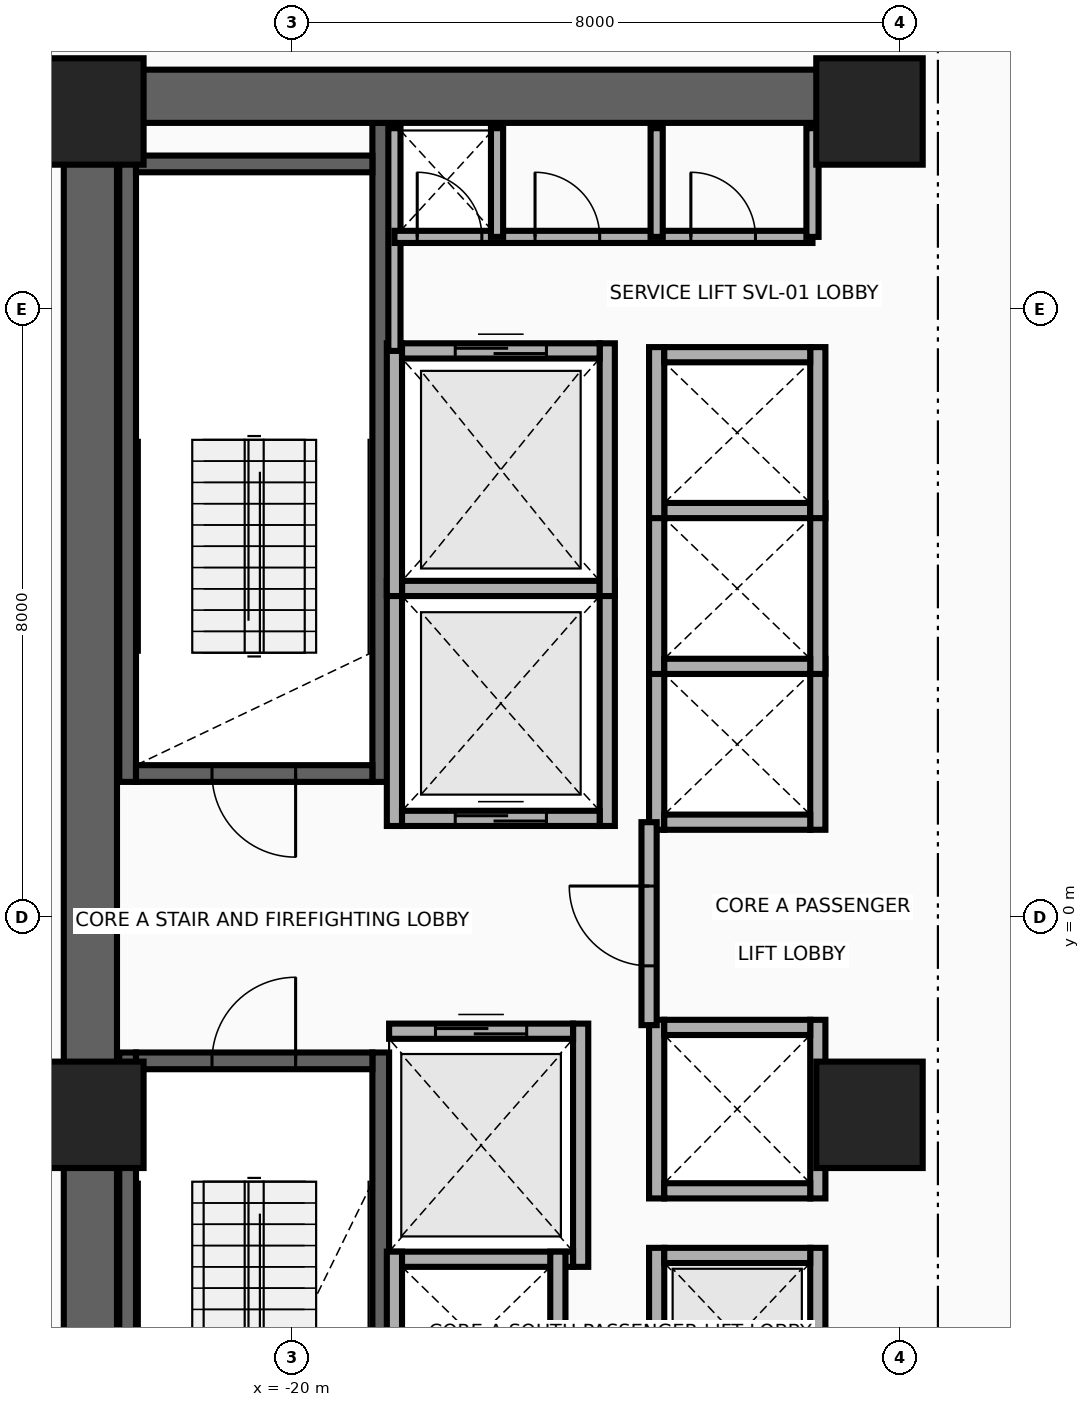
"""IFC4 building model, lengths in metres.
Left out: names, types, materials, properties, quantities, classifications, styles, units other than length and angle.
Written with IfcOpenShell. Run it as: python <this file> out.ifc"""

import sys

from ifc_helpers import new_model, si_unit, direction, frame, frame_2d, origin, origin_2d, place, context, subcontext, project, spatial, rectangle, extrude, source, transform, mapped, element, fill, save


model = new_model("IFC4")
c1 = context("Model", 3, precision=1e-05, world=origin(), true_north=direction((0.0, 1.0)))
c2 = subcontext(c1, "Body", "Model", "MODEL_VIEW")
j1 = project(units=[si_unit("LENGTHUNIT", "METRE"), si_unit("PLANEANGLEUNIT", "RADIAN")], contexts=[c1])
p1 = place(None, origin())
s1 = spatial("IfcSite", under=j1, at=p1, CompositionType="ELEMENT")
p2 = place(p1, origin())
s2 = spatial("IfcBuilding", under=s1, at=p2, CompositionType="ELEMENT")
p3 = place(p2, frame((0.0, 0.0, 85.2)))
s3 = spatial("IfcBuildingStorey", under=s2, at=p3, CompositionType="ELEMENT", Elevation=85.2)
for number, where, z_axis, x_axis in (
    (1, (-22.16, 1.78, 0.0), (0.0, 0.0, 1.0), (0.0, 1.0, 0.0)),
    (2, (-18.83, 1.78, 0.0), (0.0, 0.0, 1.0), (0.0, 1.0, 0.0)),
):
    element("IfcWall", number, at=place(p3, frame(where, z_axis=z_axis, x_axis=x_axis)), inside=s3, PredefinedType="SHEAR", context=c2, shape_type="SweptSolid", body=[
        extrude(rectangle(XDim=8.67, YDim=0.22, at=frame_2d((4.335, 0.0))), origin(), (0.0, 0.0, 1.0), 3.46),
    ])
p4 = place(p3, frame((-22.05, 1.89, 0.0), z_axis=(0.0, 0.0, 1.0), x_axis=(1.0, 0.0, 0.0)))
e3 = element("IfcWall", 3, at=p4, inside=s3, PredefinedType="SHEAR", context=c2, shape_type="SweptSolid", body=[
    extrude(rectangle(XDim=3.11, YDim=0.22, at=frame_2d((1.555, 0.0))), origin(), (0.0, 0.0, 1.0), 3.46),
])
p5 = place(p4, frame((1.0, 0.0, 0.0)))
e4 = element("IfcOpeningElement", 4, at=p5, cuts=e3, PredefinedType="OPENING", context=c2, shape_type="SweptSolid", body=[
    extrude(rectangle(XDim=1.1, YDim=2.15, at=frame_2d((0.55, 1.075))), frame((0.0, 0.125, 0.0), z_axis=(0.0, -1.0, 0.0), x_axis=(1.0, 0.0, 0.0)), (0.0, 0.0, 1.0), 0.25),
])
p6 = place(p3, frame((-22.05, 9.91, 0.0), z_axis=(0.0, 0.0, 1.0), x_axis=(1.0, 0.0, 0.0)))
e5 = element("IfcWall", 5, at=p6, inside=s3, PredefinedType="SHEAR", context=c2, shape_type="SweptSolid", body=[
    extrude(rectangle(XDim=3.11, YDim=0.22, at=frame_2d((1.555, 0.0))), origin(), (0.0, 0.0, 1.0), 3.46),
])
for number, where, z_axis, x_axis in (
    (6, (-22.16, -10.45, 0.0), (0.0, 0.0, 1.0), (0.0, 1.0, 0.0)),
    (7, (-18.83, -10.45, 0.0), (0.0, 0.0, 1.0), (0.0, 1.0, 0.0)),
):
    element("IfcWall", number, at=place(p3, frame(where, z_axis=z_axis, x_axis=x_axis)), inside=s3, PredefinedType="SHEAR", context=c2, shape_type="SweptSolid", body=[
        extrude(rectangle(XDim=8.67, YDim=0.22, at=frame_2d((4.335, 0.0))), origin(), (0.0, 0.0, 1.0), 3.46),
    ])
p7 = place(p3, frame((-22.05, -1.89, 0.0), z_axis=(0.0, 0.0, 1.0), x_axis=(1.0, 0.0, 0.0)))
e8 = element("IfcWall", 8, at=p7, inside=s3, PredefinedType="SHEAR", context=c2, shape_type="SweptSolid", body=[
    extrude(rectangle(XDim=3.11, YDim=0.22, at=frame_2d((1.555, 0.0))), origin(), (0.0, 0.0, 1.0), 3.46),
])
p8 = place(p7, frame((1.0, 0.0, 0.0)))
e9 = element("IfcOpeningElement", 9, at=p8, cuts=e8, PredefinedType="OPENING", context=c2, shape_type="SweptSolid", body=[
    extrude(rectangle(XDim=1.1, YDim=2.15, at=frame_2d((0.55, 1.075))), frame((0.0, 0.125, 0.0), z_axis=(0.0, -1.0, 0.0), x_axis=(1.0, 0.0, 0.0)), (0.0, 0.0, 1.0), 0.25),
])
p9 = place(p3, frame((-22.65, -11.15, 0.0), z_axis=(0.0, 0.0, 1.0), x_axis=(0.0, 1.0, 0.0)))
e10 = element("IfcWall", 10, at=p9, inside=s3, PredefinedType="SHEAR", context=c2, shape_type="SweptSolid", body=[
    extrude(rectangle(XDim=22.3, YDim=0.7, at=frame_2d((11.15, 0.0))), origin(), (0.0, 0.0, 1.0), 3.46),
])
p10 = place(p3, frame((-22.65, 10.8, 0.0), z_axis=(0.0, 0.0, 1.0), x_axis=(1.0, 0.0, 0.0)))
e11 = element("IfcWall", 11, at=p10, inside=s3, PredefinedType="SHEAR", context=c2, shape_type="SweptSolid", body=[
    extrude(rectangle(XDim=10.25, YDim=0.7, at=frame_2d((5.125, 0.0))), origin(), (0.0, 0.0, 1.0), 3.46),
])
m1 = source(origin(), c2, "Body", "SweptSolid", [
    extrude(rectangle(XDim=1.4, YDim=1.4, at=origin_2d()), origin(), (0.0, 0.0, 1.0), 3.7),
])
for number, where, z_axis, x_axis in (
    (12, (-22.65, -2.6, 0.0), (0.0, 0.0, 1.0), (1.0, 0.0, 0.0)),
    (13, (-12.4, -2.6, 0.0), (0.0, 0.0, 1.0), (1.0, 0.0, 0.0)),
    (14, (-22.65, 10.6, 0.0), (0.0, 0.0, 1.0), (1.0, 0.0, 0.0)),
    (15, (-12.4, 10.6, 0.0), (0.0, 0.0, 1.0), (1.0, 0.0, 0.0)),
):
    element("IfcColumn", number, at=place(p3, frame(where, z_axis=z_axis, x_axis=x_axis)), inside=s3, PredefinedType="COLUMN", context=c2, shape_type="MappedRepresentation", body=[
        mapped(m1, transform((0.0, 0.0, 0.0), x_axis=(1.0, 0.0, 0.0), y_axis=(0.0, 1.0, 0.0), z_axis=(0.0, 0.0, 1.0), scale=1.0)),
    ])
for number, where, z_axis, x_axis in (
    (16, (-18.65, 1.2, 0.0), (0.0, 0.0, 1.0), (0.0, 1.0, 0.0)),
    (17, (-15.85, 1.2, 0.0), (0.0, 0.0, 1.0), (0.0, 1.0, 0.0)),
):
    element("IfcWall", number, at=place(p3, frame(where, z_axis=z_axis, x_axis=x_axis)), inside=s3, PredefinedType="MOVABLE", context=c2, shape_type="SweptSolid", body=[
        extrude(rectangle(XDim=3.225, YDim=0.2, at=frame_2d((1.613, 0.0))), origin(), (0.0, 0.0, 1.0), 3.46),
    ])
p11 = place(p3, frame((-18.55, 1.3, 0.0), z_axis=(0.0, 0.0, 1.0), x_axis=(1.0, 0.0, 0.0)))
e18 = element("IfcWall", 18, at=p11, inside=s3, PredefinedType="MOVABLE", context=c2, shape_type="SweptSolid", body=[
    extrude(rectangle(XDim=2.6, YDim=0.2, at=frame_2d((1.3, 0.0))), origin(), (0.0, 0.0, 1.0), 3.46),
])
p12 = place(p11, frame((0.7, 0.0, 0.0)))
e19 = element("IfcOpeningElement", 19, at=p12, cuts=e18, PredefinedType="OPENING", context=c2, shape_type="SweptSolid", body=[
    extrude(rectangle(XDim=1.2, YDim=2.1, at=frame_2d((0.6, 1.05))), frame((0.0, 0.115, 0.0), z_axis=(0.0, -1.0, 0.0), x_axis=(1.0, 0.0, 0.0)), (0.0, 0.0, 1.0), 0.23),
])
p13 = place(p3, frame((-18.55, 4.325, 0.0), z_axis=(0.0, 0.0, 1.0), x_axis=(1.0, 0.0, 0.0)))
e20 = element("IfcWall", 20, at=p13, inside=s3, PredefinedType="MOVABLE", context=c2, shape_type="SweptSolid", body=[
    extrude(rectangle(XDim=2.6, YDim=0.2, at=frame_2d((1.3, 0.0))), origin(), (0.0, 0.0, 1.0), 3.46),
])
p14 = place(p3, frame((-16.2, -4.6, 0.0), z_axis=(0.0, 0.0, 1.0), x_axis=(0.0, 1.0, 0.0)))
e21 = element("IfcWall", 21, at=p14, inside=s3, PredefinedType="MOVABLE", context=c2, shape_type="SweptSolid", body=[
    extrude(rectangle(XDim=3.2, YDim=0.2, at=frame_2d((1.6, 0.0))), origin(), (0.0, 0.0, 1.0), 3.46),
])
p15 = place(p3, frame((-18.72, -4.5, 0.0), z_axis=(0.0, 0.0, 1.0), x_axis=(1.0, 0.0, 0.0)))
e22 = element("IfcWall", 22, at=p15, inside=s3, PredefinedType="MOVABLE", context=c2, shape_type="SweptSolid", body=[
    extrude(rectangle(XDim=2.42, YDim=0.2, at=frame_2d((1.21, 0.0))), origin(), (0.0, 0.0, 1.0), 3.46),
])
p16 = place(p3, frame((-18.72, -1.5, 0.0), z_axis=(0.0, 0.0, 1.0), x_axis=(1.0, 0.0, 0.0)))
e23 = element("IfcWall", 23, at=p16, inside=s3, PredefinedType="MOVABLE", context=c2, shape_type="SweptSolid", body=[
    extrude(rectangle(XDim=2.42, YDim=0.2, at=frame_2d((1.21, 0.0))), origin(), (0.0, 0.0, 1.0), 3.46),
])
p17 = place(p16, frame((0.61, 0.0, 0.0)))
e24 = element("IfcOpeningElement", 24, at=p17, cuts=e23, PredefinedType="OPENING", context=c2, shape_type="SweptSolid", body=[
    extrude(rectangle(XDim=1.2, YDim=2.1, at=frame_2d((0.6, 1.05))), frame((0.0, 0.115, 0.0), z_axis=(0.0, -1.0, 0.0), x_axis=(1.0, 0.0, 0.0)), (0.0, 0.0, 1.0), 0.23),
])
for number, where, z_axis, x_axis in (
    (25, (-18.65, 4.225, 0.0), (0.0, 0.0, 1.0), (0.0, 1.0, 0.0)),
    (26, (-15.85, 4.225, 0.0), (0.0, 0.0, 1.0), (0.0, 1.0, 0.0)),
):
    element("IfcWall", number, at=place(p3, frame(where, z_axis=z_axis, x_axis=x_axis)), inside=s3, PredefinedType="MOVABLE", context=c2, shape_type="SweptSolid", body=[
        extrude(rectangle(XDim=3.325, YDim=0.2, at=frame_2d((1.663, 0.0))), origin(), (0.0, 0.0, 1.0), 3.46),
    ])
p18 = place(p3, frame((-18.55, 7.45, 0.0), z_axis=(0.0, 0.0, 1.0), x_axis=(1.0, 0.0, 0.0)))
e27 = element("IfcWall", 27, at=p18, inside=s3, PredefinedType="MOVABLE", context=c2, shape_type="SweptSolid", body=[
    extrude(rectangle(XDim=2.6, YDim=0.2, at=frame_2d((1.3, 0.0))), origin(), (0.0, 0.0, 1.0), 3.46),
])
p19 = place(p18, frame((0.7, 0.0, 0.0)))
e28 = element("IfcOpeningElement", 28, at=p19, cuts=e27, PredefinedType="OPENING", context=c2, shape_type="SweptSolid", body=[
    extrude(rectangle(XDim=1.2, YDim=2.1, at=frame_2d((0.6, 1.05))), frame((0.0, 0.115, 0.0), z_axis=(0.0, -1.0, 0.0), x_axis=(1.0, 0.0, 0.0)), (0.0, 0.0, 1.0), 0.23),
])
for number, where, z_axis, x_axis in (
    (29, (-15.2, -6.7, 0.0), (0.0, 0.0, 1.0), (0.0, 1.0, 0.0)),
    (30, (-13.08, -6.7, 0.0), (0.0, 0.0, 1.0), (0.0, 1.0, 0.0)),
):
    element("IfcWall", number, at=place(p3, frame(where, z_axis=z_axis, x_axis=x_axis)), inside=s3, PredefinedType="MOVABLE", context=c2, shape_type="SweptSolid", body=[
        extrude(rectangle(XDim=2.35, YDim=0.2, at=frame_2d((1.175, 0.0))), origin(), (0.0, 0.0, 1.0), 3.46),
    ])
p20 = place(p3, frame((-15.1, -4.45, 0.0), z_axis=(0.0, 0.0, 1.0), x_axis=(1.0, 0.0, 0.0)))
e31 = element("IfcWall", 31, at=p20, inside=s3, PredefinedType="MOVABLE", context=c2, shape_type="SweptSolid", body=[
    extrude(rectangle(XDim=1.92, YDim=0.2, at=frame_2d((0.96, 0.0))), origin(), (0.0, 0.0, 1.0), 3.46),
])
for number, where, z_axis, x_axis in (
    (32, (-15.2, 1.15, 0.0), (0.0, 0.0, 1.0), (0.0, 1.0, 0.0)),
    (33, (-13.08, 1.15, 0.0), (0.0, 0.0, 1.0), (0.0, 1.0, 0.0)),
):
    element("IfcWall", number, at=place(p3, frame(where, z_axis=z_axis, x_axis=x_axis)), inside=s3, PredefinedType="MOVABLE", context=c2, shape_type="SweptSolid", body=[
        extrude(rectangle(XDim=2.25, YDim=0.2, at=frame_2d((1.125, 0.0))), origin(), (0.0, 0.0, 1.0), 3.46),
    ])
p21 = place(p3, frame((-15.1, 1.25, 0.0), z_axis=(0.0, 0.0, 1.0), x_axis=(1.0, 0.0, 0.0)))
e34 = element("IfcWall", 34, at=p21, inside=s3, PredefinedType="MOVABLE", context=c2, shape_type="SweptSolid", body=[
    extrude(rectangle(XDim=1.92, YDim=0.2, at=frame_2d((0.96, 0.0))), origin(), (0.0, 0.0, 1.0), 3.46),
])
for number, where, z_axis, x_axis in (
    (35, (-15.2, 3.2, 0.0), (0.0, 0.0, 1.0), (0.0, 1.0, 0.0)),
    (36, (-13.08, 3.2, 0.0), (0.0, 0.0, 1.0), (0.0, 1.0, 0.0)),
):
    element("IfcWall", number, at=place(p3, frame(where, z_axis=z_axis, x_axis=x_axis)), inside=s3, PredefinedType="MOVABLE", context=c2, shape_type="SweptSolid", body=[
        extrude(rectangle(XDim=2.25, YDim=0.2, at=frame_2d((1.125, 0.0))), origin(), (0.0, 0.0, 1.0), 3.46),
    ])
for number, where, z_axis, x_axis in (
    (37, (-15.1, 3.3, 0.0), (0.0, 0.0, 1.0), (1.0, 0.0, 0.0)),
    (38, (-15.1, 5.35, 0.0), (0.0, 0.0, 1.0), (1.0, 0.0, 0.0)),
):
    element("IfcWall", number, at=place(p3, frame(where, z_axis=z_axis, x_axis=x_axis)), inside=s3, PredefinedType="MOVABLE", context=c2, shape_type="SweptSolid", body=[
        extrude(rectangle(XDim=1.92, YDim=0.2, at=frame_2d((0.96, 0.0))), origin(), (0.0, 0.0, 1.0), 3.46),
    ])
for number, where, z_axis, x_axis in (
    (39, (-15.2, 5.25, 0.0), (0.0, 0.0, 1.0), (0.0, 1.0, 0.0)),
    (40, (-13.08, 5.25, 0.0), (0.0, 0.0, 1.0), (0.0, 1.0, 0.0)),
):
    element("IfcWall", number, at=place(p3, frame(where, z_axis=z_axis, x_axis=x_axis)), inside=s3, PredefinedType="MOVABLE", context=c2, shape_type="SweptSolid", body=[
        extrude(rectangle(XDim=2.25, YDim=0.2, at=frame_2d((1.125, 0.0))), origin(), (0.0, 0.0, 1.0), 3.46),
    ])
p22 = place(p3, frame((-15.1, 7.4, 0.0), z_axis=(0.0, 0.0, 1.0), x_axis=(1.0, 0.0, 0.0)))
e41 = element("IfcWall", 41, at=p22, inside=s3, PredefinedType="MOVABLE", context=c2, shape_type="SweptSolid", body=[
    extrude(rectangle(XDim=1.92, YDim=0.2, at=frame_2d((0.96, 0.0))), origin(), (0.0, 0.0, 1.0), 3.46),
])
for number, where, z_axis, x_axis in (
    (42, (-18.65, -6.7, 0.0), (0.0, 0.0, 1.0), (0.0, 1.0, 0.0)),
    (43, (-16.5, -6.7, 0.0), (0.0, 0.0, 1.0), (0.0, 1.0, 0.0)),
):
    element("IfcWall", number, at=place(p3, frame(where, z_axis=z_axis, x_axis=x_axis)), inside=s3, PredefinedType="MOVABLE", context=c2, shape_type="SweptSolid", body=[
        extrude(rectangle(XDim=2.3, YDim=0.2, at=frame_2d((1.15, 0.0))), origin(), (0.0, 0.0, 1.0), 3.46),
    ])
for number, where, z_axis, x_axis in (
    (44, (-15.2, -3.7, 0.0), (0.0, 0.0, 1.0), (0.0, 1.0, 0.0)),
    (45, (-13.08, -3.7, 0.0), (0.0, 0.0, 1.0), (0.0, 1.0, 0.0)),
):
    element("IfcWall", number, at=place(p3, frame(where, z_axis=z_axis, x_axis=x_axis)), inside=s3, PredefinedType="MOVABLE", context=c2, shape_type="SweptSolid", body=[
        extrude(rectangle(XDim=2.35, YDim=0.2, at=frame_2d((1.175, 0.0))), origin(), (0.0, 0.0, 1.0), 3.46),
    ])
for number, where, z_axis, x_axis in (
    (46, (-15.1, -3.6, 0.0), (0.0, 0.0, 1.0), (1.0, 0.0, 0.0)),
    (47, (-15.1, -1.45, 0.0), (0.0, 0.0, 1.0), (1.0, 0.0, 0.0)),
):
    element("IfcWall", number, at=place(p3, frame(where, z_axis=z_axis, x_axis=x_axis)), inside=s3, PredefinedType="MOVABLE", context=c2, shape_type="SweptSolid", body=[
        extrude(rectangle(XDim=1.92, YDim=0.2, at=frame_2d((0.96, 0.0))), origin(), (0.0, 0.0, 1.0), 3.46),
    ])
p23 = place(p3, frame((-15.3, -1.42, 0.0), z_axis=(0.0, 0.0, 1.0), x_axis=(0.0, 1.0, 0.0)))
e48 = element("IfcWall", 48, at=p23, inside=s3, PredefinedType="PARTITIONING", context=c2, shape_type="SweptSolid", body=[
    extrude(rectangle(XDim=2.67, YDim=0.2, at=frame_2d((1.335, 0.0))), origin(), (0.0, 0.0, 1.0), 3.46),
])
p24 = place(p23, frame((0.78, 0.0, 0.0)))
e49 = element("IfcOpeningElement", 49, at=p24, cuts=e48, PredefinedType="OPENING", context=c2, shape_type="SweptSolid", body=[
    extrude(rectangle(XDim=1.05, YDim=2.15, at=frame_2d((0.525, 1.075))), frame((0.0, 0.115, 0.0), z_axis=(0.0, -1.0, 0.0), x_axis=(1.0, 0.0, 0.0)), (0.0, 0.0, 1.0), 0.23),
])
p25 = place(p3, frame((-18.65, 7.45, 0.0), z_axis=(0.0, 0.0, 1.0), x_axis=(0.0, 1.0, 0.0)))
e50 = element("IfcWall", 50, at=p25, inside=s3, PredefinedType="PARTITIONING", context=c2, shape_type="SweptSolid", body=[
    extrude(rectangle(XDim=2.93, YDim=0.16, at=frame_2d((1.465, 0.0))), origin(), (0.0, 0.0, 1.0), 3.46),
])
p26 = place(p3, frame((-18.65, 8.95, 0.0), z_axis=(0.0, 0.0, 1.0), x_axis=(1.0, 0.0, 0.0)))
e51 = element("IfcWall", 51, at=p26, inside=s3, PredefinedType="PARTITIONING", context=c2, shape_type="SweptSolid", body=[
    extrude(rectangle(XDim=5.5, YDim=0.16, at=frame_2d((2.75, 0.0))), origin(), (0.0, 0.0, 1.0), 3.46),
])
p27 = place(p26, frame((0.3, 0.0, 0.0)))
e52 = element("IfcOpeningElement", 52, at=p27, cuts=e51, PredefinedType="OPENING", context=c2, shape_type="SweptSolid", body=[
    extrude(rectangle(XDim=0.85, YDim=2.05, at=frame_2d((0.425, 1.025))), frame((0.0, 0.095, 0.0), z_axis=(0.0, -1.0, 0.0), x_axis=(1.0, 0.0, 0.0)), (0.0, 0.0, 1.0), 0.19),
])
p28 = place(p26, frame((1.85, 0.0, 0.0)))
e53 = element("IfcOpeningElement", 53, at=p28, cuts=e51, PredefinedType="OPENING", context=c2, shape_type="SweptSolid", body=[
    extrude(rectangle(XDim=0.85, YDim=2.05, at=frame_2d((0.425, 1.025))), frame((0.0, 0.095, 0.0), z_axis=(0.0, -1.0, 0.0), x_axis=(1.0, 0.0, 0.0)), (0.0, 0.0, 1.0), 0.19),
])
p29 = place(p26, frame((3.9, 0.0, 0.0)))
e54 = element("IfcOpeningElement", 54, at=p29, cuts=e51, PredefinedType="OPENING", context=c2, shape_type="SweptSolid", body=[
    extrude(rectangle(XDim=0.85, YDim=2.05, at=frame_2d((0.425, 1.025))), frame((0.0, 0.095, 0.0), z_axis=(0.0, -1.0, 0.0), x_axis=(1.0, 0.0, 0.0)), (0.0, 0.0, 1.0), 0.19),
])
for number, where, z_axis, x_axis in (
    (55, (-13.15, 8.95, 0.0), (0.0, 0.0, 1.0), (0.0, 1.0, 0.0)),
    (56, (-17.3, 8.95, 0.0), (0.0, 0.0, 1.0), (0.0, 1.0, 0.0)),
    (57, (-15.2, 8.95, 0.0), (0.0, 0.0, 1.0), (0.0, 1.0, 0.0)),
):
    element("IfcWall", number, at=place(p3, frame(where, z_axis=z_axis, x_axis=x_axis)), inside=s3, PredefinedType="PARTITIONING", context=c2, shape_type="SweptSolid", body=[
        extrude(rectangle(XDim=1.43, YDim=0.16, at=frame_2d((0.715, 0.0))), origin(), (0.0, 0.0, 1.0), 3.46),
    ])
p30 = place(p12, origin())
e58 = element("IfcDoor", 58, at=p30, inside=s3, OperationType="DOUBLE_DOOR_SLIDING", PredefinedType="DOOR", context=c2, shape_type="SweptSolid", body=[
    extrude(rectangle(XDim=1.2, YDim=2.1, at=frame_2d((0.6, 1.05))), frame((0.0, 0.025, 0.0), z_axis=(0.0, -1.0, 0.0), x_axis=(1.0, 0.0, 0.0)), (0.0, 0.0, 1.0), 0.05),
])
fill(e19, e58)
p31 = place(p17, origin())
e59 = element("IfcDoor", 59, at=p31, inside=s3, OperationType="DOUBLE_DOOR_SLIDING", PredefinedType="DOOR", context=c2, shape_type="SweptSolid", body=[
    extrude(rectangle(XDim=1.2, YDim=2.1, at=frame_2d((0.6, 1.05))), frame((0.0, 0.025, 0.0), z_axis=(0.0, -1.0, 0.0), x_axis=(1.0, 0.0, 0.0)), (0.0, 0.0, 1.0), 0.05),
])
fill(e24, e59)
p32 = place(p19, origin())
e60 = element("IfcDoor", 60, at=p32, inside=s3, OperationType="DOUBLE_DOOR_SLIDING", PredefinedType="DOOR", context=c2, shape_type="SweptSolid", body=[
    extrude(rectangle(XDim=1.2, YDim=2.1, at=frame_2d((0.6, 1.05))), frame((0.0, 0.025, 0.0), z_axis=(0.0, -1.0, 0.0), x_axis=(1.0, 0.0, 0.0)), (0.0, 0.0, 1.0), 0.05),
])
fill(e28, e60)
p33 = place(p24, origin())
e61 = element("IfcDoor", 61, at=p33, inside=s3, OperationType="SINGLE_SWING_RIGHT", PredefinedType="DOOR", context=c2, shape_type="SweptSolid", body=[
    extrude(rectangle(XDim=1.05, YDim=2.15, at=frame_2d((0.525, 1.075))), frame((0.0, 0.025, 0.0), z_axis=(0.0, -1.0, 0.0), x_axis=(1.0, 0.0, 0.0)), (0.0, 0.0, 1.0), 0.05),
])
fill(e49, e61)
p34 = place(p5, frame((1.1, 0.0, 0.0), z_axis=(0.0, 0.0, 1.0), x_axis=(-1.0, 0.0, 0.0)))
e62 = element("IfcDoor", 62, at=p34, inside=s3, OperationType="SINGLE_SWING_LEFT", PredefinedType="DOOR", context=c2, shape_type="SweptSolid", body=[
    extrude(rectangle(XDim=1.1, YDim=2.15, at=frame_2d((0.55, 1.075))), frame((0.0, 0.025, 0.0), z_axis=(0.0, -1.0, 0.0), x_axis=(1.0, 0.0, 0.0)), (0.0, 0.0, 1.0), 0.05),
])
fill(e4, e62)
p35 = place(p8, origin())
e63 = element("IfcDoor", 63, at=p35, inside=s3, OperationType="SINGLE_SWING_RIGHT", PredefinedType="DOOR", context=c2, shape_type="SweptSolid", body=[
    extrude(rectangle(XDim=1.1, YDim=2.15, at=frame_2d((0.55, 1.075))), frame((0.0, 0.025, 0.0), z_axis=(0.0, -1.0, 0.0), x_axis=(1.0, 0.0, 0.0)), (0.0, 0.0, 1.0), 0.05),
])
fill(e9, e63)
p36 = place(p27, origin())
e64 = element("IfcDoor", 64, at=p36, inside=s3, OperationType="SINGLE_SWING_LEFT", PredefinedType="DOOR", context=c2, shape_type="SweptSolid", body=[
    extrude(rectangle(XDim=0.85, YDim=2.05, at=frame_2d((0.425, 1.025))), frame((0.0, 0.025, 0.0), z_axis=(0.0, -1.0, 0.0), x_axis=(1.0, 0.0, 0.0)), (0.0, 0.0, 1.0), 0.05),
])
fill(e52, e64)
p37 = place(p28, origin())
e65 = element("IfcDoor", 65, at=p37, inside=s3, OperationType="SINGLE_SWING_RIGHT", PredefinedType="DOOR", context=c2, shape_type="SweptSolid", body=[
    extrude(rectangle(XDim=0.85, YDim=2.05, at=frame_2d((0.425, 1.025))), frame((0.0, 0.025, 0.0), z_axis=(0.0, -1.0, 0.0), x_axis=(1.0, 0.0, 0.0)), (0.0, 0.0, 1.0), 0.05),
])
fill(e53, e65)
p38 = place(p29, origin())
e66 = element("IfcDoor", 66, at=p38, inside=s3, OperationType="SINGLE_SWING_LEFT", PredefinedType="DOOR", context=c2, shape_type="SweptSolid", body=[
    extrude(rectangle(XDim=0.85, YDim=2.05, at=frame_2d((0.425, 1.025))), frame((0.0, 0.025, 0.0), z_axis=(0.0, -1.0, 0.0), x_axis=(1.0, 0.0, 0.0)), (0.0, 0.0, 1.0), 0.05),
])
fill(e54, e66)
save(model, sys.argv[1])
